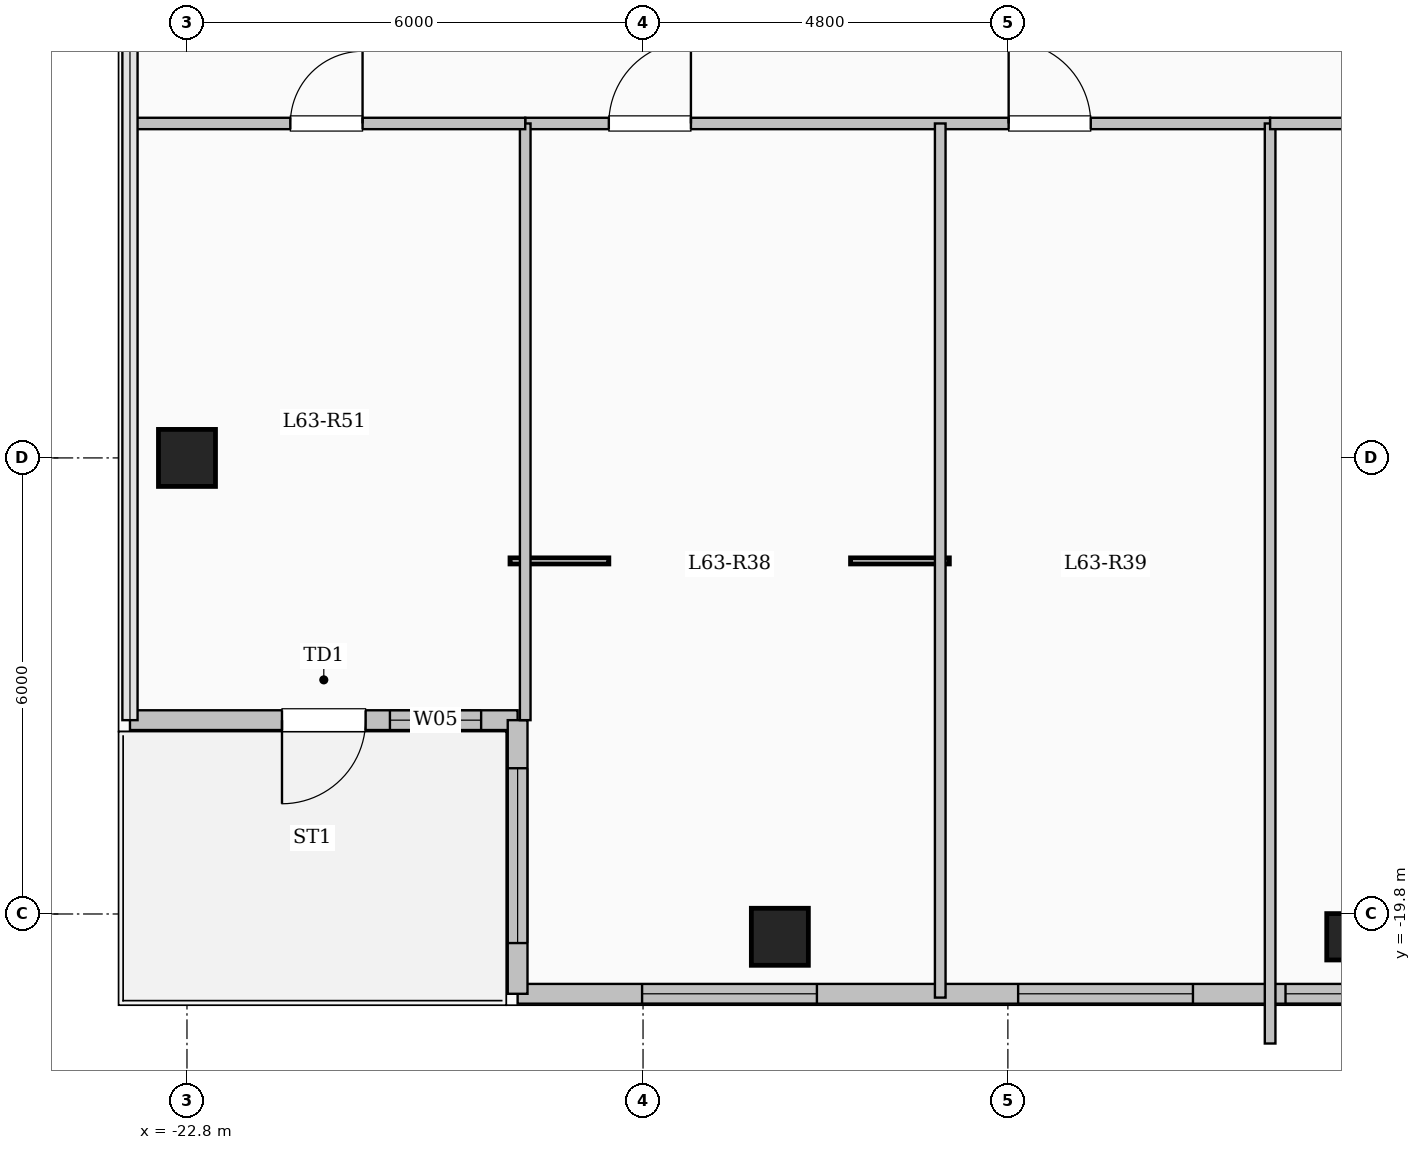
"""IFC4 building model, lengths in metres.
Left out: names, types, materials, properties, quantities, classifications, styles, units other than length and angle.
Written with IfcOpenShell. Run it as: python <this file> out.ifc"""

import sys

from ifc_helpers import new_model, si_unit, direction, frame, frame_2d, origin, origin_2d, place, context, subcontext, project, spatial, rectangle, hollow_circle, extrude, element, fill, save


model = new_model("IFC4")
c1 = context("Model", 3, precision=1e-05, world=origin(), true_north=direction((0.0, 1.0)))
c2 = subcontext(c1, "Body", "Model", "MODEL_VIEW")
j1 = project(units=[si_unit("LENGTHUNIT", "METRE"), si_unit("PLANEANGLEUNIT", "RADIAN")], contexts=[c1])
p1 = place(None, origin())
s1 = spatial("IfcSite", under=j1, at=p1, CompositionType="ELEMENT")
p2 = place(p1, origin())
s2 = spatial("IfcBuilding", under=s1, at=p2, CompositionType="ELEMENT")
p3 = place(p2, frame((0.0, 0.0, 231.75)))
s3 = spatial("IfcBuildingStorey", under=s2, at=p3, CompositionType="ELEMENT", Elevation=231.75)
p4 = place(p3, frame((-15.0, -20.1, 0.0), z_axis=(0.0, 0.0, 1.0), x_axis=(1.0, 0.0, 0.0)))
e1 = element("IfcColumn", 1, at=p4, inside=s3, PredefinedType="COLUMN", context=c2, shape_type="SweptSolid", body=[
    extrude(rectangle(XDim=0.75, YDim=0.75, at=origin_2d()), origin(), (0.0, 0.0, 1.0), 4.65),
])
p5 = place(p3, frame((-7.5, -20.1, 0.0), z_axis=(0.0, 0.0, 1.0), x_axis=(1.0, 0.0, 0.0)))
e2 = element("IfcColumn", 2, at=p5, inside=s3, PredefinedType="COLUMN", context=c2, shape_type="SweptSolid", body=[
    extrude(hollow_circle(Radius=0.305, WallThickness=0.025, at=origin_2d()), origin(), (0.0, 0.0, 1.0), 4.65),
])
p6 = place(p3, frame((-22.8, -13.8, 0.0), z_axis=(0.0, 0.0, 1.0), x_axis=(1.0, 0.0, 0.0)))
e3 = element("IfcColumn", 3, at=p6, inside=s3, PredefinedType="COLUMN", context=c2, shape_type="SweptSolid", body=[
    extrude(rectangle(XDim=0.75, YDim=0.75, at=origin_2d()), origin(), (0.0, 0.0, 1.0), 4.65),
])
p7 = place(p3, frame((-18.45, -17.25, 0.0), z_axis=(0.0, 0.0, 1.0), x_axis=(-1.0, 0.0, 0.0)))
e4 = element("IfcWall", 4, at=p7, inside=s3, PredefinedType="SOLIDWALL", context=c2, shape_type="SweptSolid", body=[
    extrude(rectangle(XDim=5.1, YDim=0.26, at=frame_2d((2.55, 0.0))), origin(), (0.0, 0.0, 1.0), 4.35),
])
p8 = place(p7, frame((2.0, 0.0, 0.0)))
e5 = element("IfcOpeningElement", 5, at=p8, cuts=e4, PredefinedType="OPENING", context=c2, shape_type="SweptSolid", body=[
    extrude(rectangle(XDim=1.1, YDim=2.2, at=frame_2d((0.55, 1.1))), frame((0.0, 0.14, 0.0), z_axis=(0.0, -1.0, 0.0), x_axis=(1.0, 0.0, 0.0)), (0.0, 0.0, 1.0), 0.28),
])
p9 = place(p7, frame((0.48, 0.0, 0.95)))
e6 = element("IfcOpeningElement", 6, at=p9, cuts=e4, PredefinedType="OPENING", context=c2, shape_type="SweptSolid", body=[
    extrude(rectangle(XDim=1.2, YDim=1.5, at=frame_2d((0.6, 0.75))), frame((0.0, 0.14, 0.0), z_axis=(0.0, -1.0, 0.0), x_axis=(1.0, 0.0, 0.0)), (0.0, 0.0, 1.0), 0.28),
])
p10 = place(p3, frame((-7.35, -20.85, 0.0), z_axis=(0.0, 0.0, 1.0), x_axis=(-1.0, 0.0, 0.0)))
e7 = element("IfcWall", 7, at=p10, inside=s3, PredefinedType="SOLIDWALL", context=c2, shape_type="SweptSolid", body=[
    extrude(rectangle(XDim=11.1, YDim=0.26, at=frame_2d((5.55, 0.0))), origin(), (0.0, 0.0, 1.0), 4.35),
])
p11 = place(p10, frame((0.147, 0.0, 0.95)))
e8 = element("IfcOpeningElement", 8, at=p11, cuts=e7, PredefinedType="OPENING", context=c2, shape_type="SweptSolid", body=[
    extrude(rectangle(XDim=0.85, YDim=1.5, at=frame_2d((0.425, 0.75))), frame((0.0, 0.14, 0.0), z_axis=(0.0, -1.0, 0.0), x_axis=(1.0, 0.0, 0.0)), (0.0, 0.0, 1.0), 0.28),
])
p12 = place(p10, frame((2.215, 0.0, 0.85)))
e9 = element("IfcOpeningElement", 9, at=p12, cuts=e7, PredefinedType="OPENING", context=c2, shape_type="SweptSolid", body=[
    extrude(rectangle(XDim=2.3, YDim=2.2, at=frame_2d((1.15, 1.1))), frame((0.0, 0.14, 0.0), z_axis=(0.0, -1.0, 0.0), x_axis=(1.0, 0.0, 0.0)), (0.0, 0.0, 1.0), 0.28),
])
p13 = place(p10, frame((7.162, 0.0, 0.85)))
e10 = element("IfcOpeningElement", 10, at=p13, cuts=e7, PredefinedType="OPENING", context=c2, shape_type="SweptSolid", body=[
    extrude(rectangle(XDim=2.3, YDim=2.2, at=frame_2d((1.15, 1.1))), frame((0.0, 0.14, 0.0), z_axis=(0.0, -1.0, 0.0), x_axis=(1.0, 0.0, 0.0)), (0.0, 0.0, 1.0), 0.28),
])
p14 = place(p3, frame((-18.45, -20.85, 0.0), z_axis=(0.0, 0.0, 1.0), x_axis=(0.0, 1.0, 0.0)))
e11 = element("IfcWall", 11, at=p14, inside=s3, PredefinedType="SOLIDWALL", context=c2, shape_type="SweptSolid", body=[
    extrude(rectangle(XDim=3.6, YDim=0.26, at=frame_2d((1.8, 0.0))), origin(), (0.0, 0.0, 1.0), 4.35),
])
p15 = place(p14, frame((0.667, 0.0, 0.85)))
e12 = element("IfcOpeningElement", 12, at=p15, cuts=e11, PredefinedType="OPENING", context=c2, shape_type="SweptSolid", body=[
    extrude(rectangle(XDim=2.3, YDim=2.2, at=frame_2d((1.15, 1.1))), frame((0.0, 0.14, 0.0), z_axis=(0.0, -1.0, 0.0), x_axis=(1.0, 0.0, 0.0)), (0.0, 0.0, 1.0), 0.28),
])
p16 = place(p3, frame((-18.35, -9.4, 0.0), z_axis=(0.0, 0.0, 1.0), x_axis=(1.0, 0.0, 0.0)))
e13 = element("IfcWall", 13, at=p16, inside=s3, PredefinedType="PARTITIONING", context=c2, shape_type="SweptSolid", body=[
    extrude(rectangle(XDim=9.8, YDim=0.15, at=frame_2d((4.9, 0.0))), origin(), (0.0, 0.0, 1.0), 4.35),
])
p17 = place(p16, frame((1.1, 0.0, 0.0)))
e14 = element("IfcOpeningElement", 14, at=p17, cuts=e13, PredefinedType="OPENING", context=c2, shape_type="SweptSolid", body=[
    extrude(rectangle(XDim=1.08, YDim=2.15, at=frame_2d((0.54, 1.075))), frame((0.0, 0.085, 0.0), z_axis=(0.0, -1.0, 0.0), x_axis=(1.0, 0.0, 0.0)), (0.0, 0.0, 1.0), 0.17),
])
p18 = place(p16, frame((6.36, 0.0, 0.0)))
e15 = element("IfcOpeningElement", 15, at=p18, cuts=e13, PredefinedType="OPENING", context=c2, shape_type="SweptSolid", body=[
    extrude(rectangle(XDim=1.08, YDim=2.15, at=frame_2d((0.54, 1.075))), frame((0.0, 0.085, 0.0), z_axis=(0.0, -1.0, 0.0), x_axis=(1.0, 0.0, 0.0)), (0.0, 0.0, 1.0), 0.17),
])
p19 = place(p3, frame((-12.89, -20.9, 0.0), z_axis=(0.0, 0.0, 1.0), x_axis=(0.0, 1.0, 0.0)))
e16 = element("IfcWall", 16, at=p19, inside=s3, PredefinedType="PARTITIONING", context=c2, shape_type="SweptSolid", body=[
    extrude(rectangle(XDim=11.5, YDim=0.14, at=frame_2d((5.75, 0.0))), origin(), (0.0, 0.0, 1.0), 4.35),
])
p20 = place(p3, frame((-8.55, -21.504, 0.0), z_axis=(0.0, 0.0, 1.0), x_axis=(0.0, 1.0, 0.0)))
e17 = element("IfcWall", 17, at=p20, inside=s3, PredefinedType="PARTITIONING", context=c2, shape_type="SweptSolid", body=[
    extrude(rectangle(XDim=12.104, YDim=0.14, at=frame_2d((6.052, 0.0))), origin(), (0.0, 0.0, 1.0), 4.35),
])
p21 = place(p3, frame((-8.55, -9.4, 0.0), z_axis=(0.0, 0.0, 1.0), x_axis=(1.0, 0.0, 0.0)))
e18 = element("IfcWall", 18, at=p21, inside=s3, PredefinedType="PARTITIONING", context=c2, shape_type="SweptSolid", body=[
    extrude(rectangle(XDim=17.1, YDim=0.15, at=frame_2d((8.55, 0.0))), origin(), (0.0, 0.0, 1.0), 4.35),
])
p22 = place(p21, frame((1.85, 0.0, 0.0)))
e19 = element("IfcOpeningElement", 19, at=p22, cuts=e18, PredefinedType="OPENING", context=c2, shape_type="SweptSolid", body=[
    extrude(rectangle(XDim=1.08, YDim=2.15, at=frame_2d((0.54, 1.075))), frame((0.0, 0.085, 0.0), z_axis=(0.0, -1.0, 0.0), x_axis=(1.0, 0.0, 0.0)), (0.0, 0.0, 1.0), 0.17),
])
p23 = place(p21, frame((10.5, 0.0, 0.0)))
e20 = element("IfcOpeningElement", 20, at=p23, cuts=e18, PredefinedType="OPENING", context=c2, shape_type="SweptSolid", body=[
    extrude(rectangle(XDim=1.08, YDim=2.15, at=frame_2d((0.54, 1.075))), frame((0.0, 0.085, 0.0), z_axis=(0.0, -1.0, 0.0), x_axis=(1.0, 0.0, 0.0)), (0.0, 0.0, 1.0), 0.17),
])
p24 = place(p3, frame((-18.35, -17.25, 0.0), z_axis=(0.0, 0.0, 1.0), x_axis=(0.0, 1.0, 0.0)))
e21 = element("IfcWall", 21, at=p24, inside=s3, PredefinedType="PARTITIONING", context=c2, shape_type="SweptSolid", body=[
    extrude(rectangle(XDim=7.85, YDim=0.14, at=frame_2d((3.925, 0.0))), origin(), (0.0, 0.0, 1.0), 4.35),
])
p25 = place(p3, frame((-23.58, -9.4, 0.0), z_axis=(0.0, 0.0, 1.0), x_axis=(1.0, 0.0, 0.0)))
e22 = element("IfcWall", 22, at=p25, inside=s3, PredefinedType="PARTITIONING", context=c2, shape_type="SweptSolid", body=[
    extrude(rectangle(XDim=5.23, YDim=0.15, at=frame_2d((2.615, 0.0))), origin(), (0.0, 0.0, 1.0), 4.35),
])
p26 = place(p25, frame((2.14, 0.0, 0.0)))
e23 = element("IfcOpeningElement", 23, at=p26, cuts=e22, PredefinedType="OPENING", context=c2, shape_type="SweptSolid", body=[
    extrude(rectangle(XDim=0.95, YDim=2.15, at=frame_2d((0.475, 1.075))), frame((0.0, 0.085, 0.0), z_axis=(0.0, -1.0, 0.0), x_axis=(1.0, 0.0, 0.0)), (0.0, 0.0, 1.0), 0.17),
])
p27 = place(p8, origin())
e24 = element("IfcDoor", 24, at=p27, inside=s3, OperationType="SINGLE_SWING_RIGHT", PredefinedType="DOOR", context=c2, shape_type="SweptSolid", body=[
    extrude(rectangle(XDim=1.1, YDim=2.2, at=frame_2d((0.55, 1.1))), frame((0.0, 0.025, 0.0), z_axis=(0.0, -1.0, 0.0), x_axis=(1.0, 0.0, 0.0)), (0.0, 0.0, 1.0), 0.05),
])
fill(e5, e24)
p28 = place(p9, origin())
e25 = element("IfcWindow", 25, at=p28, inside=s3, PartitioningType="SINGLE_PANEL", PredefinedType="WINDOW", context=c2, shape_type="SweptSolid", body=[
    extrude(rectangle(XDim=1.2, YDim=1.5, at=frame_2d((0.6, 0.75))), frame((0.0, 0.03, 0.0), z_axis=(0.0, -1.0, 0.0), x_axis=(1.0, 0.0, 0.0)), (0.0, 0.0, 1.0), 0.06),
])
fill(e6, e25)
p29 = place(p11, origin())
e26 = element("IfcWindow", 26, at=p29, inside=s3, PartitioningType="SINGLE_PANEL", PredefinedType="WINDOW", context=c2, shape_type="SweptSolid", body=[
    extrude(rectangle(XDim=0.85, YDim=1.5, at=frame_2d((0.425, 0.75))), frame((0.0, 0.03, 0.0), z_axis=(0.0, -1.0, 0.0), x_axis=(1.0, 0.0, 0.0)), (0.0, 0.0, 1.0), 0.06),
])
fill(e8, e26)
p30 = place(p12, origin())
e27 = element("IfcWindow", 27, at=p30, inside=s3, PartitioningType="SINGLE_PANEL", PredefinedType="WINDOW", context=c2, shape_type="SweptSolid", body=[
    extrude(rectangle(XDim=2.3, YDim=2.2, at=frame_2d((1.15, 1.1))), frame((0.0, 0.03, 0.0), z_axis=(0.0, -1.0, 0.0), x_axis=(1.0, 0.0, 0.0)), (0.0, 0.0, 1.0), 0.06),
])
fill(e9, e27)
p31 = place(p13, origin())
e28 = element("IfcWindow", 28, at=p31, inside=s3, PartitioningType="SINGLE_PANEL", PredefinedType="WINDOW", context=c2, shape_type="SweptSolid", body=[
    extrude(rectangle(XDim=2.3, YDim=2.2, at=frame_2d((1.15, 1.1))), frame((0.0, 0.03, 0.0), z_axis=(0.0, -1.0, 0.0), x_axis=(1.0, 0.0, 0.0)), (0.0, 0.0, 1.0), 0.06),
])
fill(e10, e28)
p32 = place(p15, origin())
e29 = element("IfcWindow", 29, at=p32, inside=s3, PartitioningType="SINGLE_PANEL", PredefinedType="WINDOW", context=c2, shape_type="SweptSolid", body=[
    extrude(rectangle(XDim=2.3, YDim=2.2, at=frame_2d((1.15, 1.1))), frame((0.0, 0.03, 0.0), z_axis=(0.0, -1.0, 0.0), x_axis=(1.0, 0.0, 0.0)), (0.0, 0.0, 1.0), 0.06),
])
fill(e12, e29)
p33 = place(p17, origin())
e30 = element("IfcDoor", 30, at=p33, inside=s3, OperationType="SINGLE_SWING_RIGHT", PredefinedType="DOOR", context=c2, shape_type="SweptSolid", body=[
    extrude(rectangle(XDim=1.08, YDim=2.15, at=frame_2d((0.54, 1.075))), frame((0.0, 0.025, 0.0), z_axis=(0.0, -1.0, 0.0), x_axis=(1.0, 0.0, 0.0)), (0.0, 0.0, 1.0), 0.05),
])
fill(e14, e30)
p34 = place(p18, origin())
e31 = element("IfcDoor", 31, at=p34, inside=s3, OperationType="SINGLE_SWING_LEFT", PredefinedType="DOOR", context=c2, shape_type="SweptSolid", body=[
    extrude(rectangle(XDim=1.08, YDim=2.15, at=frame_2d((0.54, 1.075))), frame((0.0, 0.025, 0.0), z_axis=(0.0, -1.0, 0.0), x_axis=(1.0, 0.0, 0.0)), (0.0, 0.0, 1.0), 0.05),
])
fill(e15, e31)
p35 = place(p26, origin())
e32 = element("IfcDoor", 32, at=p35, inside=s3, OperationType="SINGLE_SWING_RIGHT", PredefinedType="DOOR", context=c2, shape_type="SweptSolid", body=[
    extrude(rectangle(XDim=0.95, YDim=2.15, at=frame_2d((0.475, 1.075))), frame((0.0, 0.025, 0.0), z_axis=(0.0, -1.0, 0.0), x_axis=(1.0, 0.0, 0.0)), (0.0, 0.0, 1.0), 0.05),
])
fill(e23, e32)
save(model, sys.argv[1])
